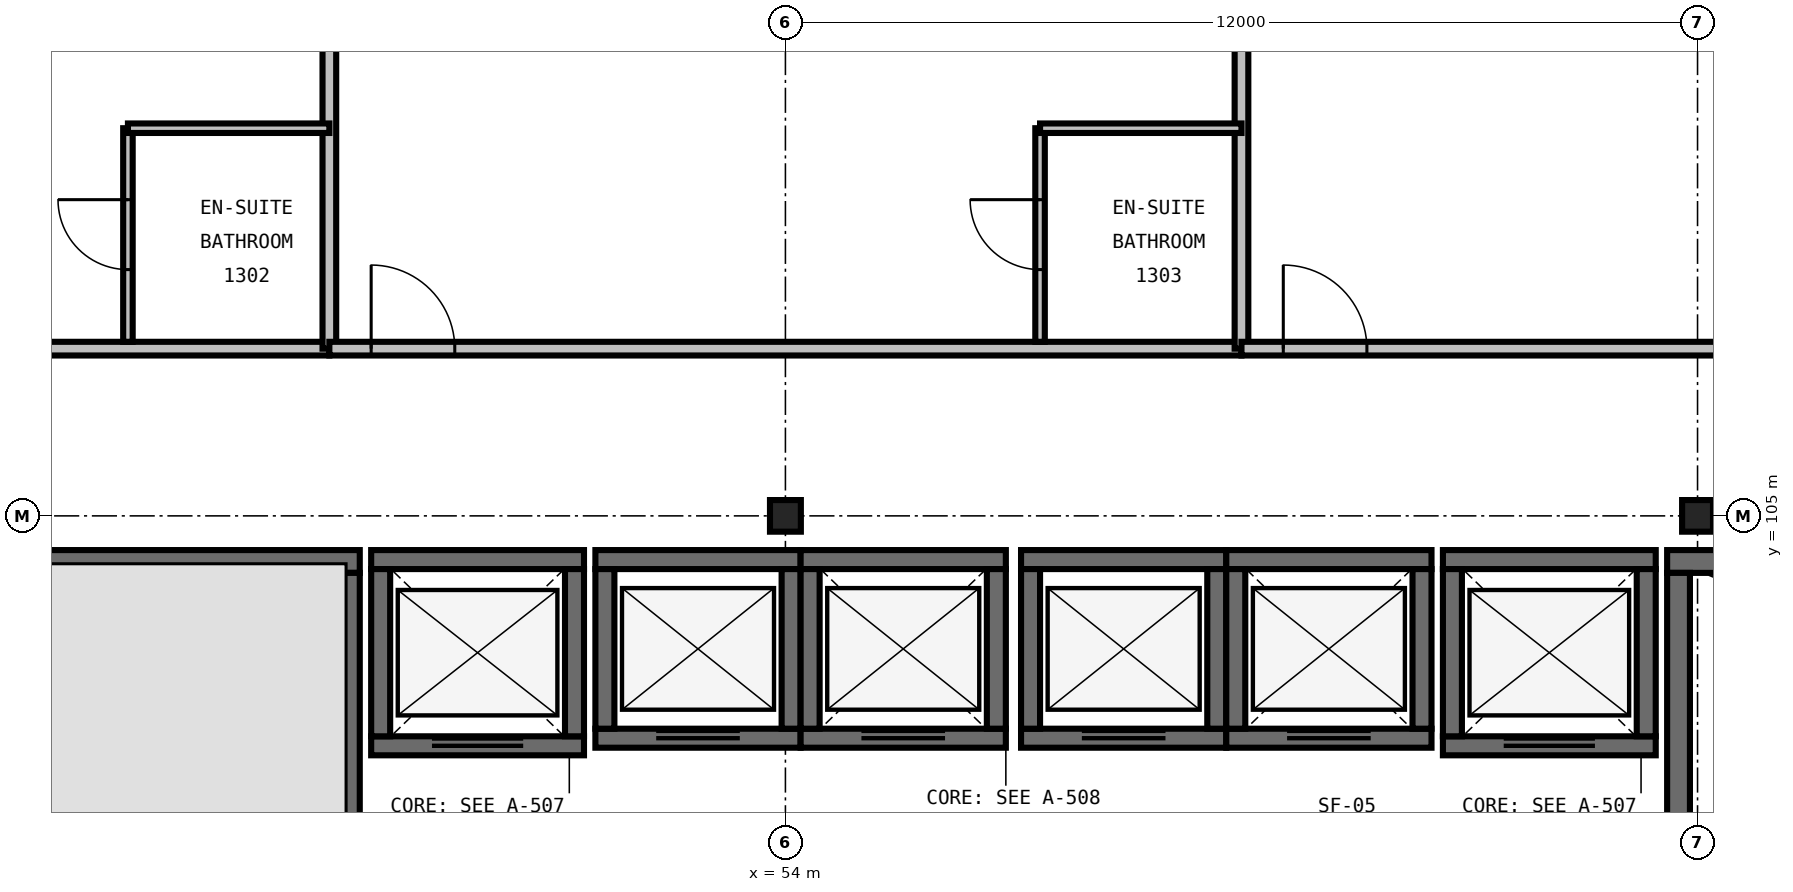
"""IFC4 building model, lengths in metres.
Left out: names, types, materials, properties, quantities, classifications, styles, units other than length and angle.
Written with IfcOpenShell. Run it as: python <this file> out.ifc"""

import sys

from ifc_helpers import new_model, si_unit, direction, frame, frame_2d, origin, origin_2d, place, context, subcontext, project, spatial, rectangle, i_section, extrude, element, fill, save


model = new_model("IFC4")
c1 = context("Model", 3, precision=1e-05, world=origin(), true_north=direction((0.0, 1.0)))
c2 = subcontext(c1, "Body", "Model", "MODEL_VIEW")
j1 = project(units=[si_unit("LENGTHUNIT", "METRE"), si_unit("PLANEANGLEUNIT", "RADIAN")], contexts=[c1])
p1 = place(None, origin())
s1 = spatial("IfcSite", under=j1, at=p1, CompositionType="ELEMENT")
p2 = place(p1, origin())
s2 = spatial("IfcBuilding", under=s1, at=p2, CompositionType="ELEMENT")
p3 = place(p2, frame((0.0, 0.0, 56.4)))
s3 = spatial("IfcBuildingStorey", under=s2, at=p3, CompositionType="ELEMENT", Elevation=56.4)
for number, where, z_axis, x_axis in (
    (1, (54.0, 105.0, 0.0), (0.0, 0.0, 1.0), (1.0, 0.0, 0.0)),
    (2, (66.0, 105.0, 0.0), (0.0, 0.0, 1.0), (1.0, 0.0, 0.0)),
):
    element("IfcColumn", number, at=place(p3, frame(where, z_axis=z_axis, x_axis=x_axis)), inside=s3, PredefinedType="COLUMN", context=c2, shape_type="SweptSolid", body=[
        extrude(i_section(OverallWidth=0.406, OverallDepth=0.416, WebThickness=0.03, FlangeThickness=0.048, FilletRadius=0.031, at=origin_2d()), origin(), (0.0, 0.0, 1.0), 3.6),
    ])
p4 = place(p3, frame((48.4, 104.4, 0.0), z_axis=(0.0, 0.0, 1.0), x_axis=(-1.0, 0.0, 0.0)))
e3 = element("IfcWall", 3, at=p4, inside=s3, PredefinedType="SHEAR", context=c2, shape_type="SweptSolid", body=[
    extrude(rectangle(XDim=9.8, YDim=0.3, at=frame_2d((4.9, 0.0))), origin(), (0.0, 0.0, 1.0), 3.6),
])
p5 = place(p3, frame((48.25, 100.61, 0.0), z_axis=(0.0, 0.0, 1.0), x_axis=(0.0, 1.0, 0.0)))
e4 = element("IfcWall", 4, at=p5, inside=s3, PredefinedType="SHEAR", context=c2, shape_type="SweptSolid", body=[
    extrude(rectangle(XDim=3.64, YDim=0.3, at=frame_2d((1.82, 0.0))), origin(), (0.0, 0.0, 1.0), 3.6),
])
p6 = place(p3, frame((75.4, 104.4, 0.0), z_axis=(0.0, 0.0, 1.0), x_axis=(-1.0, 0.0, 0.0)))
e5 = element("IfcWall", 5, at=p6, inside=s3, PredefinedType="SHEAR", context=c2, shape_type="SweptSolid", body=[
    extrude(rectangle(XDim=9.8, YDim=0.3, at=frame_2d((4.9, 0.0))), origin(), (0.0, 0.0, 1.0), 3.6),
])
p7 = place(p3, frame((65.75, 104.25, 0.0), z_axis=(0.0, 0.0, 1.0), x_axis=(0.0, -1.0, 0.0)))
e6 = element("IfcWall", 6, at=p7, inside=s3, PredefinedType="SHEAR", context=c2, shape_type="SweptSolid", body=[
    extrude(rectangle(XDim=3.64, YDim=0.3, at=frame_2d((1.82, 0.0))), origin(), (0.0, 0.0, 1.0), 3.6),
])
p8 = place(p3, frame((48.55, 101.975, 0.0), z_axis=(0.0, 0.0, 1.0), x_axis=(1.0, 0.0, 0.0)))
e7 = element("IfcWall", 7, at=p8, inside=s3, PredefinedType="SHEAR", context=c2, shape_type="SweptSolid", body=[
    extrude(rectangle(XDim=2.8, YDim=0.25, at=frame_2d((1.4, 0.0))), origin(), (0.0, 0.0, 1.0), 3.6),
])
p9 = place(p8, frame((0.8, 0.0, 0.0)))
e8 = element("IfcOpeningElement", 8, at=p9, cuts=e7, PredefinedType="OPENING", context=c2, shape_type="SweptSolid", body=[
    extrude(rectangle(XDim=1.2, YDim=2.2, at=frame_2d((0.6, 1.1))), frame((0.0, 0.14, 0.0), z_axis=(0.0, -1.0, 0.0), x_axis=(1.0, 0.0, 0.0)), (0.0, 0.0, 1.0), 0.28),
])
p10 = place(p3, frame((51.35, 104.425, 0.0), z_axis=(0.0, 0.0, 1.0), x_axis=(-1.0, 0.0, 0.0)))
e9 = element("IfcWall", 9, at=p10, inside=s3, PredefinedType="SHEAR", context=c2, shape_type="SweptSolid", body=[
    extrude(rectangle(XDim=2.8, YDim=0.25, at=frame_2d((1.4, 0.0))), origin(), (0.0, 0.0, 1.0), 3.6),
])
for number, where, z_axis, x_axis in (
    (10, (48.675, 104.3, 0.0), (0.0, 0.0, 1.0), (0.0, -1.0, 0.0)),
    (11, (51.225, 102.1, 0.0), (0.0, 0.0, 1.0), (0.0, 1.0, 0.0)),
):
    element("IfcWall", number, at=place(p3, frame(where, z_axis=z_axis, x_axis=x_axis)), inside=s3, PredefinedType="SHEAR", context=c2, shape_type="SweptSolid", body=[
        extrude(rectangle(XDim=2.2, YDim=0.25, at=frame_2d((1.1, 0.0))), origin(), (0.0, 0.0, 1.0), 3.6),
    ])
p11 = place(p3, frame((62.65, 101.975, 0.0), z_axis=(0.0, 0.0, 1.0), x_axis=(1.0, 0.0, 0.0)))
e12 = element("IfcWall", 12, at=p11, inside=s3, PredefinedType="SHEAR", context=c2, shape_type="SweptSolid", body=[
    extrude(rectangle(XDim=2.8, YDim=0.25, at=frame_2d((1.4, 0.0))), origin(), (0.0, 0.0, 1.0), 3.6),
])
p12 = place(p11, frame((0.8, 0.0, 0.0)))
e13 = element("IfcOpeningElement", 13, at=p12, cuts=e12, PredefinedType="OPENING", context=c2, shape_type="SweptSolid", body=[
    extrude(rectangle(XDim=1.2, YDim=2.2, at=frame_2d((0.6, 1.1))), frame((0.0, 0.14, 0.0), z_axis=(0.0, -1.0, 0.0), x_axis=(1.0, 0.0, 0.0)), (0.0, 0.0, 1.0), 0.28),
])
p13 = place(p3, frame((65.45, 104.425, 0.0), z_axis=(0.0, 0.0, 1.0), x_axis=(-1.0, 0.0, 0.0)))
e14 = element("IfcWall", 14, at=p13, inside=s3, PredefinedType="SHEAR", context=c2, shape_type="SweptSolid", body=[
    extrude(rectangle(XDim=2.8, YDim=0.25, at=frame_2d((1.4, 0.0))), origin(), (0.0, 0.0, 1.0), 3.6),
])
for number, where, z_axis, x_axis in (
    (15, (62.775, 104.3, 0.0), (0.0, 0.0, 1.0), (0.0, -1.0, 0.0)),
    (16, (65.325, 102.1, 0.0), (0.0, 0.0, 1.0), (0.0, 1.0, 0.0)),
):
    element("IfcWall", number, at=place(p3, frame(where, z_axis=z_axis, x_axis=x_axis)), inside=s3, PredefinedType="SHEAR", context=c2, shape_type="SweptSolid", body=[
        extrude(rectangle(XDim=2.2, YDim=0.25, at=frame_2d((1.1, 0.0))), origin(), (0.0, 0.0, 1.0), 3.6),
    ])
p14 = place(p3, frame((51.5, 102.075, 0.0), z_axis=(0.0, 0.0, 1.0), x_axis=(1.0, 0.0, 0.0)))
e17 = element("IfcWall", 17, at=p14, inside=s3, PredefinedType="SHEAR", context=c2, shape_type="SweptSolid", body=[
    extrude(rectangle(XDim=2.7, YDim=0.25, at=frame_2d((1.35, 0.0))), origin(), (0.0, 0.0, 1.0), 3.6),
])
p15 = place(p14, frame((0.8, 0.0, 0.0)))
e18 = element("IfcOpeningElement", 18, at=p15, cuts=e17, PredefinedType="OPENING", context=c2, shape_type="SweptSolid", body=[
    extrude(rectangle(XDim=1.1, YDim=2.2, at=frame_2d((0.55, 1.1))), frame((0.0, 0.14, 0.0), z_axis=(0.0, -1.0, 0.0), x_axis=(1.0, 0.0, 0.0)), (0.0, 0.0, 1.0), 0.28),
])
p16 = place(p3, frame((54.2, 104.425, 0.0), z_axis=(0.0, 0.0, 1.0), x_axis=(-1.0, 0.0, 0.0)))
e19 = element("IfcWall", 19, at=p16, inside=s3, PredefinedType="SHEAR", context=c2, shape_type="SweptSolid", body=[
    extrude(rectangle(XDim=2.7, YDim=0.25, at=frame_2d((1.35, 0.0))), origin(), (0.0, 0.0, 1.0), 3.6),
])
for number, where, z_axis, x_axis in (
    (20, (51.625, 104.3, 0.0), (0.0, 0.0, 1.0), (0.0, -1.0, 0.0)),
    (21, (54.075, 102.2, 0.0), (0.0, 0.0, 1.0), (0.0, 1.0, 0.0)),
):
    element("IfcWall", number, at=place(p3, frame(where, z_axis=z_axis, x_axis=x_axis)), inside=s3, PredefinedType="SHEAR", context=c2, shape_type="SweptSolid", body=[
        extrude(rectangle(XDim=2.1, YDim=0.25, at=frame_2d((1.05, 0.0))), origin(), (0.0, 0.0, 1.0), 3.6),
    ])
p17 = place(p3, frame((54.2, 102.075, 0.0), z_axis=(0.0, 0.0, 1.0), x_axis=(1.0, 0.0, 0.0)))
e22 = element("IfcWall", 22, at=p17, inside=s3, PredefinedType="SHEAR", context=c2, shape_type="SweptSolid", body=[
    extrude(rectangle(XDim=2.7, YDim=0.25, at=frame_2d((1.35, 0.0))), origin(), (0.0, 0.0, 1.0), 3.6),
])
p18 = place(p17, frame((0.8, 0.0, 0.0)))
e23 = element("IfcOpeningElement", 23, at=p18, cuts=e22, PredefinedType="OPENING", context=c2, shape_type="SweptSolid", body=[
    extrude(rectangle(XDim=1.1, YDim=2.2, at=frame_2d((0.55, 1.1))), frame((0.0, 0.14, 0.0), z_axis=(0.0, -1.0, 0.0), x_axis=(1.0, 0.0, 0.0)), (0.0, 0.0, 1.0), 0.28),
])
p19 = place(p3, frame((56.9, 104.425, 0.0), z_axis=(0.0, 0.0, 1.0), x_axis=(-1.0, 0.0, 0.0)))
e24 = element("IfcWall", 24, at=p19, inside=s3, PredefinedType="SHEAR", context=c2, shape_type="SweptSolid", body=[
    extrude(rectangle(XDim=2.7, YDim=0.25, at=frame_2d((1.35, 0.0))), origin(), (0.0, 0.0, 1.0), 3.6),
])
for number, where, z_axis, x_axis in (
    (25, (54.325, 104.3, 0.0), (0.0, 0.0, 1.0), (0.0, -1.0, 0.0)),
    (26, (56.775, 102.2, 0.0), (0.0, 0.0, 1.0), (0.0, 1.0, 0.0)),
):
    element("IfcWall", number, at=place(p3, frame(where, z_axis=z_axis, x_axis=x_axis)), inside=s3, PredefinedType="SHEAR", context=c2, shape_type="SweptSolid", body=[
        extrude(rectangle(XDim=2.1, YDim=0.25, at=frame_2d((1.05, 0.0))), origin(), (0.0, 0.0, 1.0), 3.6),
    ])
p20 = place(p3, frame((57.1, 102.075, 0.0), z_axis=(0.0, 0.0, 1.0), x_axis=(1.0, 0.0, 0.0)))
e27 = element("IfcWall", 27, at=p20, inside=s3, PredefinedType="SHEAR", context=c2, shape_type="SweptSolid", body=[
    extrude(rectangle(XDim=2.7, YDim=0.25, at=frame_2d((1.35, 0.0))), origin(), (0.0, 0.0, 1.0), 3.6),
])
p21 = place(p20, frame((0.8, 0.0, 0.0)))
e28 = element("IfcOpeningElement", 28, at=p21, cuts=e27, PredefinedType="OPENING", context=c2, shape_type="SweptSolid", body=[
    extrude(rectangle(XDim=1.1, YDim=2.2, at=frame_2d((0.55, 1.1))), frame((0.0, 0.14, 0.0), z_axis=(0.0, -1.0, 0.0), x_axis=(1.0, 0.0, 0.0)), (0.0, 0.0, 1.0), 0.28),
])
p22 = place(p3, frame((59.8, 104.425, 0.0), z_axis=(0.0, 0.0, 1.0), x_axis=(-1.0, 0.0, 0.0)))
e29 = element("IfcWall", 29, at=p22, inside=s3, PredefinedType="SHEAR", context=c2, shape_type="SweptSolid", body=[
    extrude(rectangle(XDim=2.7, YDim=0.25, at=frame_2d((1.35, 0.0))), origin(), (0.0, 0.0, 1.0), 3.6),
])
for number, where, z_axis, x_axis in (
    (30, (57.225, 104.3, 0.0), (0.0, 0.0, 1.0), (0.0, -1.0, 0.0)),
    (31, (59.675, 102.2, 0.0), (0.0, 0.0, 1.0), (0.0, 1.0, 0.0)),
):
    element("IfcWall", number, at=place(p3, frame(where, z_axis=z_axis, x_axis=x_axis)), inside=s3, PredefinedType="SHEAR", context=c2, shape_type="SweptSolid", body=[
        extrude(rectangle(XDim=2.1, YDim=0.25, at=frame_2d((1.05, 0.0))), origin(), (0.0, 0.0, 1.0), 3.6),
    ])
p23 = place(p3, frame((59.8, 102.075, 0.0), z_axis=(0.0, 0.0, 1.0), x_axis=(1.0, 0.0, 0.0)))
e32 = element("IfcWall", 32, at=p23, inside=s3, PredefinedType="SHEAR", context=c2, shape_type="SweptSolid", body=[
    extrude(rectangle(XDim=2.7, YDim=0.25, at=frame_2d((1.35, 0.0))), origin(), (0.0, 0.0, 1.0), 3.6),
])
p24 = place(p23, frame((0.8, 0.0, 0.0)))
e33 = element("IfcOpeningElement", 33, at=p24, cuts=e32, PredefinedType="OPENING", context=c2, shape_type="SweptSolid", body=[
    extrude(rectangle(XDim=1.1, YDim=2.2, at=frame_2d((0.55, 1.1))), frame((0.0, 0.14, 0.0), z_axis=(0.0, -1.0, 0.0), x_axis=(1.0, 0.0, 0.0)), (0.0, 0.0, 1.0), 0.28),
])
p25 = place(p3, frame((62.5, 104.425, 0.0), z_axis=(0.0, 0.0, 1.0), x_axis=(-1.0, 0.0, 0.0)))
e34 = element("IfcWall", 34, at=p25, inside=s3, PredefinedType="SHEAR", context=c2, shape_type="SweptSolid", body=[
    extrude(rectangle(XDim=2.7, YDim=0.25, at=frame_2d((1.35, 0.0))), origin(), (0.0, 0.0, 1.0), 3.6),
])
for number, where, z_axis, x_axis in (
    (35, (59.925, 104.3, 0.0), (0.0, 0.0, 1.0), (0.0, -1.0, 0.0)),
    (36, (62.375, 102.2, 0.0), (0.0, 0.0, 1.0), (0.0, 1.0, 0.0)),
):
    element("IfcWall", number, at=place(p3, frame(where, z_axis=z_axis, x_axis=x_axis)), inside=s3, PredefinedType="SHEAR", context=c2, shape_type="SweptSolid", body=[
        extrude(rectangle(XDim=2.1, YDim=0.25, at=frame_2d((1.05, 0.0))), origin(), (0.0, 0.0, 1.0), 3.6),
    ])
p26 = place(p3, frame((36.0, 107.2, 0.0), z_axis=(0.0, 0.0, 1.0), x_axis=(1.0, 0.0, 0.0)))
e37 = element("IfcWall", 37, at=p26, inside=s3, PredefinedType="PARTITIONING", context=c2, shape_type="SweptSolid", body=[
    extrude(rectangle(XDim=12.0, YDim=0.18, at=frame_2d((6.0, 0.0))), origin(), (0.0, 0.0, 1.0), 3.29),
])
p27 = place(p26, frame((0.55, 0.0, 0.0)))
e38 = element("IfcOpeningElement", 38, at=p27, cuts=e37, PredefinedType="OPENING", context=c2, shape_type="SweptSolid", body=[
    extrude(rectangle(XDim=1.1, YDim=2.2, at=frame_2d((0.55, 1.1))), frame((0.0, 0.105, 0.0), z_axis=(0.0, -1.0, 0.0), x_axis=(1.0, 0.0, 0.0)), (0.0, 0.0, 1.0), 0.21),
])
p28 = place(p3, frame((48.0, 107.2, 0.0), z_axis=(0.0, 0.0, 1.0), x_axis=(0.0, 1.0, 0.0)))
e39 = element("IfcWall", 39, at=p28, inside=s3, PredefinedType="PARTITIONING", context=c2, shape_type="SweptSolid", body=[
    extrude(rectangle(XDim=9.64, YDim=0.18, at=frame_2d((4.82, 0.0))), origin(), (0.0, 0.0, 1.0), 3.29),
])
p29 = place(p3, frame((45.35, 107.29, 0.0), z_axis=(0.0, 0.0, 1.0), x_axis=(0.0, 1.0, 0.0)))
e40 = element("IfcWall", 40, at=p29, inside=s3, PredefinedType="PARTITIONING", context=c2, shape_type="SweptSolid", body=[
    extrude(rectangle(XDim=2.81, YDim=0.125, at=frame_2d((1.405, 0.0))), origin(), (0.0, 0.0, 1.0), 3.29),
])
p30 = place(p29, frame((0.95, 0.0, 0.0)))
e41 = element("IfcOpeningElement", 41, at=p30, cuts=e40, PredefinedType="OPENING", context=c2, shape_type="SweptSolid", body=[
    extrude(rectangle(XDim=0.92, YDim=2.1, at=frame_2d((0.46, 1.05))), frame((0.0, 0.077, 0.0), z_axis=(0.0, -1.0, 0.0), x_axis=(1.0, 0.0, 0.0)), (0.0, 0.0, 1.0), 0.155),
])
p31 = place(p3, frame((45.35, 110.1, 0.0), z_axis=(0.0, 0.0, 1.0), x_axis=(1.0, 0.0, 0.0)))
e42 = element("IfcWall", 42, at=p31, inside=s3, PredefinedType="PARTITIONING", context=c2, shape_type="SweptSolid", body=[
    extrude(rectangle(XDim=2.65, YDim=0.125, at=frame_2d((1.325, 0.0))), origin(), (0.0, 0.0, 1.0), 3.29),
])
p32 = place(p3, frame((48.0, 107.2, 0.0), z_axis=(0.0, 0.0, 1.0), x_axis=(1.0, 0.0, 0.0)))
e43 = element("IfcWall", 43, at=p32, inside=s3, PredefinedType="PARTITIONING", context=c2, shape_type="SweptSolid", body=[
    extrude(rectangle(XDim=12.0, YDim=0.18, at=frame_2d((6.0, 0.0))), origin(), (0.0, 0.0, 1.0), 3.29),
])
p33 = place(p32, frame((0.55, 0.0, 0.0)))
e44 = element("IfcOpeningElement", 44, at=p33, cuts=e43, PredefinedType="OPENING", context=c2, shape_type="SweptSolid", body=[
    extrude(rectangle(XDim=1.1, YDim=2.2, at=frame_2d((0.55, 1.1))), frame((0.0, 0.105, 0.0), z_axis=(0.0, -1.0, 0.0), x_axis=(1.0, 0.0, 0.0)), (0.0, 0.0, 1.0), 0.21),
])
p34 = place(p3, frame((60.0, 107.2, 0.0), z_axis=(0.0, 0.0, 1.0), x_axis=(0.0, 1.0, 0.0)))
e45 = element("IfcWall", 45, at=p34, inside=s3, PredefinedType="PARTITIONING", context=c2, shape_type="SweptSolid", body=[
    extrude(rectangle(XDim=9.64, YDim=0.18, at=frame_2d((4.82, 0.0))), origin(), (0.0, 0.0, 1.0), 3.29),
])
p35 = place(p3, frame((57.35, 107.29, 0.0), z_axis=(0.0, 0.0, 1.0), x_axis=(0.0, 1.0, 0.0)))
e46 = element("IfcWall", 46, at=p35, inside=s3, PredefinedType="PARTITIONING", context=c2, shape_type="SweptSolid", body=[
    extrude(rectangle(XDim=2.81, YDim=0.125, at=frame_2d((1.405, 0.0))), origin(), (0.0, 0.0, 1.0), 3.29),
])
p36 = place(p35, frame((0.95, 0.0, 0.0)))
e47 = element("IfcOpeningElement", 47, at=p36, cuts=e46, PredefinedType="OPENING", context=c2, shape_type="SweptSolid", body=[
    extrude(rectangle(XDim=0.92, YDim=2.1, at=frame_2d((0.46, 1.05))), frame((0.0, 0.077, 0.0), z_axis=(0.0, -1.0, 0.0), x_axis=(1.0, 0.0, 0.0)), (0.0, 0.0, 1.0), 0.155),
])
p37 = place(p3, frame((57.35, 110.1, 0.0), z_axis=(0.0, 0.0, 1.0), x_axis=(1.0, 0.0, 0.0)))
e48 = element("IfcWall", 48, at=p37, inside=s3, PredefinedType="PARTITIONING", context=c2, shape_type="SweptSolid", body=[
    extrude(rectangle(XDim=2.65, YDim=0.125, at=frame_2d((1.325, 0.0))), origin(), (0.0, 0.0, 1.0), 3.29),
])
p38 = place(p3, frame((60.0, 107.2, 0.0), z_axis=(0.0, 0.0, 1.0), x_axis=(1.0, 0.0, 0.0)))
e49 = element("IfcWall", 49, at=p38, inside=s3, PredefinedType="PARTITIONING", context=c2, shape_type="SweptSolid", body=[
    extrude(rectangle(XDim=12.0, YDim=0.18, at=frame_2d((6.0, 0.0))), origin(), (0.0, 0.0, 1.0), 3.29),
])
p39 = place(p38, frame((0.55, 0.0, 0.0)))
e50 = element("IfcOpeningElement", 50, at=p39, cuts=e49, PredefinedType="OPENING", context=c2, shape_type="SweptSolid", body=[
    extrude(rectangle(XDim=1.1, YDim=2.2, at=frame_2d((0.55, 1.1))), frame((0.0, 0.105, 0.0), z_axis=(0.0, -1.0, 0.0), x_axis=(1.0, 0.0, 0.0)), (0.0, 0.0, 1.0), 0.21),
])
p40 = place(p9, origin())
e51 = element("IfcDoor", 51, at=p40, inside=s3, OperationType="DOUBLE_DOOR_SLIDING", PredefinedType="DOOR", context=c2, shape_type="SweptSolid", body=[
    extrude(rectangle(XDim=1.2, YDim=2.2, at=frame_2d((0.6, 1.1))), frame((0.0, 0.025, 0.0), z_axis=(0.0, -1.0, 0.0), x_axis=(1.0, 0.0, 0.0)), (0.0, 0.0, 1.0), 0.05),
])
fill(e8, e51)
p41 = place(p12, origin())
e52 = element("IfcDoor", 52, at=p41, inside=s3, OperationType="DOUBLE_DOOR_SLIDING", PredefinedType="DOOR", context=c2, shape_type="SweptSolid", body=[
    extrude(rectangle(XDim=1.2, YDim=2.2, at=frame_2d((0.6, 1.1))), frame((0.0, 0.025, 0.0), z_axis=(0.0, -1.0, 0.0), x_axis=(1.0, 0.0, 0.0)), (0.0, 0.0, 1.0), 0.05),
])
fill(e13, e52)
p42 = place(p15, origin())
e53 = element("IfcDoor", 53, at=p42, inside=s3, OperationType="DOUBLE_DOOR_SLIDING", PredefinedType="DOOR", context=c2, shape_type="SweptSolid", body=[
    extrude(rectangle(XDim=1.1, YDim=2.2, at=frame_2d((0.55, 1.1))), frame((0.0, 0.025, 0.0), z_axis=(0.0, -1.0, 0.0), x_axis=(1.0, 0.0, 0.0)), (0.0, 0.0, 1.0), 0.05),
])
fill(e18, e53)
p43 = place(p18, origin())
e54 = element("IfcDoor", 54, at=p43, inside=s3, OperationType="DOUBLE_DOOR_SLIDING", PredefinedType="DOOR", context=c2, shape_type="SweptSolid", body=[
    extrude(rectangle(XDim=1.1, YDim=2.2, at=frame_2d((0.55, 1.1))), frame((0.0, 0.025, 0.0), z_axis=(0.0, -1.0, 0.0), x_axis=(1.0, 0.0, 0.0)), (0.0, 0.0, 1.0), 0.05),
])
fill(e23, e54)
p44 = place(p21, origin())
e55 = element("IfcDoor", 55, at=p44, inside=s3, OperationType="DOUBLE_DOOR_SLIDING", PredefinedType="DOOR", context=c2, shape_type="SweptSolid", body=[
    extrude(rectangle(XDim=1.1, YDim=2.2, at=frame_2d((0.55, 1.1))), frame((0.0, 0.025, 0.0), z_axis=(0.0, -1.0, 0.0), x_axis=(1.0, 0.0, 0.0)), (0.0, 0.0, 1.0), 0.05),
])
fill(e28, e55)
p45 = place(p24, origin())
e56 = element("IfcDoor", 56, at=p45, inside=s3, OperationType="DOUBLE_DOOR_SLIDING", PredefinedType="DOOR", context=c2, shape_type="SweptSolid", body=[
    extrude(rectangle(XDim=1.1, YDim=2.2, at=frame_2d((0.55, 1.1))), frame((0.0, 0.025, 0.0), z_axis=(0.0, -1.0, 0.0), x_axis=(1.0, 0.0, 0.0)), (0.0, 0.0, 1.0), 0.05),
])
fill(e33, e56)
p46 = place(p30, origin())
e57 = element("IfcDoor", 57, at=p46, inside=s3, OperationType="SINGLE_SWING_RIGHT", PredefinedType="DOOR", context=c2, shape_type="SweptSolid", body=[
    extrude(rectangle(XDim=0.92, YDim=2.1, at=frame_2d((0.46, 1.05))), frame((0.0, 0.025, 0.0), z_axis=(0.0, -1.0, 0.0), x_axis=(1.0, 0.0, 0.0)), (0.0, 0.0, 1.0), 0.05),
])
fill(e41, e57)
p47 = place(p33, origin())
e58 = element("IfcDoor", 58, at=p47, inside=s3, OperationType="SINGLE_SWING_LEFT", PredefinedType="DOOR", context=c2, shape_type="SweptSolid", body=[
    extrude(rectangle(XDim=1.1, YDim=2.2, at=frame_2d((0.55, 1.1))), frame((0.0, 0.025, 0.0), z_axis=(0.0, -1.0, 0.0), x_axis=(1.0, 0.0, 0.0)), (0.0, 0.0, 1.0), 0.05),
])
fill(e44, e58)
p48 = place(p36, origin())
e59 = element("IfcDoor", 59, at=p48, inside=s3, OperationType="SINGLE_SWING_RIGHT", PredefinedType="DOOR", context=c2, shape_type="SweptSolid", body=[
    extrude(rectangle(XDim=0.92, YDim=2.1, at=frame_2d((0.46, 1.05))), frame((0.0, 0.025, 0.0), z_axis=(0.0, -1.0, 0.0), x_axis=(1.0, 0.0, 0.0)), (0.0, 0.0, 1.0), 0.05),
])
fill(e47, e59)
p49 = place(p39, origin())
e60 = element("IfcDoor", 60, at=p49, inside=s3, OperationType="SINGLE_SWING_LEFT", PredefinedType="DOOR", context=c2, shape_type="SweptSolid", body=[
    extrude(rectangle(XDim=1.1, YDim=2.2, at=frame_2d((0.55, 1.1))), frame((0.0, 0.025, 0.0), z_axis=(0.0, -1.0, 0.0), x_axis=(1.0, 0.0, 0.0)), (0.0, 0.0, 1.0), 0.05),
])
fill(e50, e60)
save(model, sys.argv[1])
